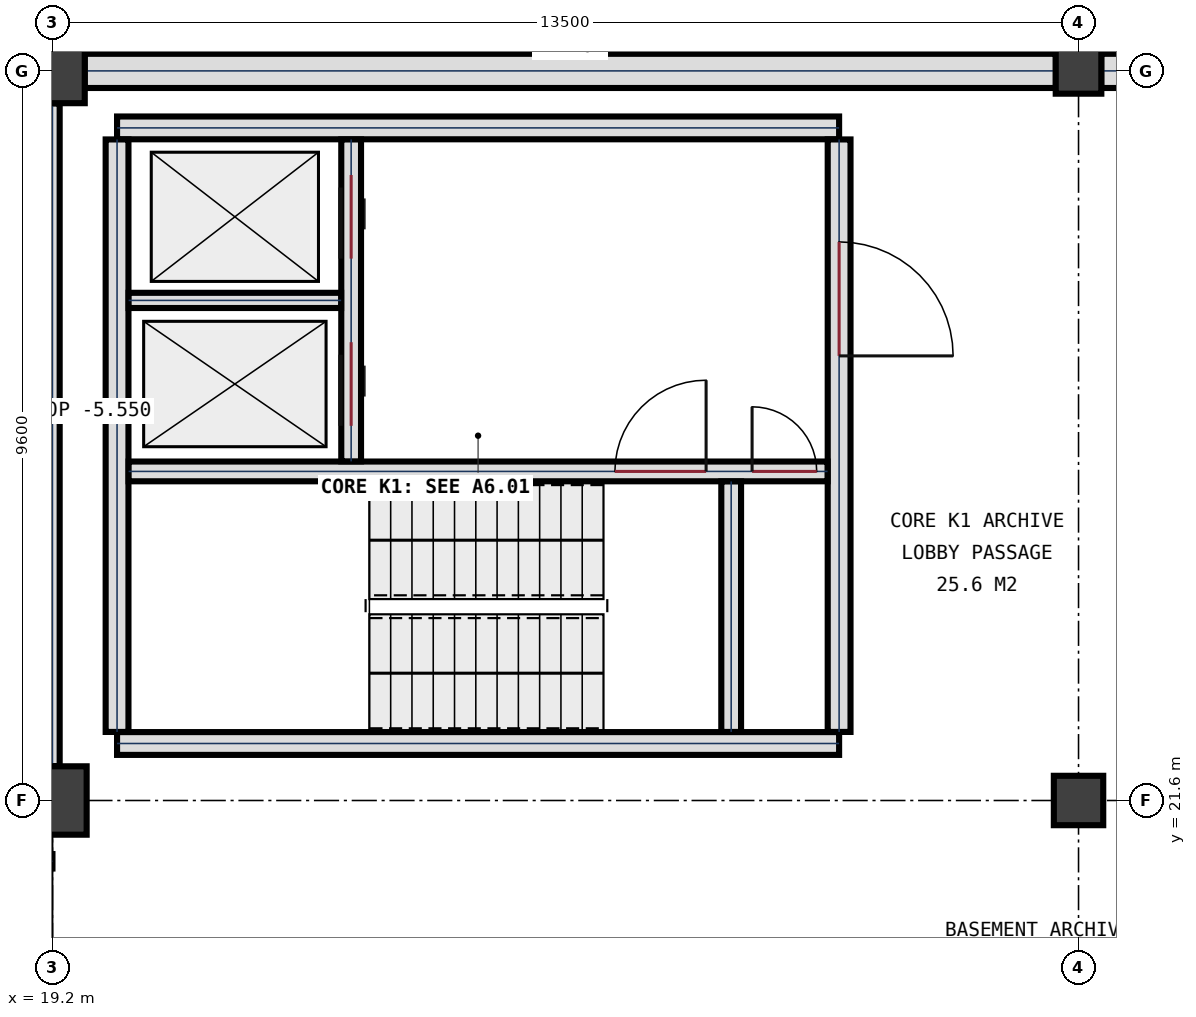
"""IFC4 building model, lengths in metres.
Left out: names, types, materials, properties, quantities, classifications, styles, units other than length and angle.
Written with IfcOpenShell. Run it as: python <this file> out.ifc"""

import sys

from ifc_helpers import new_model, si_unit, direction, frame, frame_2d, origin, origin_2d, place, context, subcontext, project, spatial, rectangle, extrude, element, fill, save


model = new_model("IFC4")
c1 = context("Model", 3, precision=1e-05, world=origin(), true_north=direction((0.0, 1.0)))
c2 = subcontext(c1, "Body", "Model", "MODEL_VIEW")
j1 = project(units=[si_unit("LENGTHUNIT", "METRE"), si_unit("PLANEANGLEUNIT", "RADIAN")], contexts=[c1])
p1 = place(None, origin())
s1 = spatial("IfcSite", under=j1, at=p1, CompositionType="ELEMENT")
p2 = place(p1, origin())
s2 = spatial("IfcBuilding", under=s1, at=p2, CompositionType="ELEMENT")
p3 = place(p2, frame((0.0, 0.0, -8.4)))
s3 = spatial("IfcBuildingStorey", under=s2, at=p3, CompositionType="ELEMENT", Elevation=-8.4)
p4 = place(p3, frame((19.2, 21.6, 0.0), z_axis=(0.0, 0.0, 1.0), x_axis=(1.0, 0.0, 0.0)))
e1 = element("IfcColumn", 1, at=p4, inside=s3, PredefinedType="COLUMN", context=c2, shape_type="SweptSolid", body=[
    extrude(rectangle(XDim=0.9, YDim=0.9, at=origin_2d()), origin(), (0.0, 0.0, 1.0), 4.2),
])
p5 = place(p3, frame((19.2, 31.2, 0.0), z_axis=(0.0, 0.0, 1.0), x_axis=(1.0, 0.0, 0.0)))
e2 = element("IfcColumn", 2, at=p5, inside=s3, PredefinedType="COLUMN", context=c2, shape_type="SweptSolid", body=[
    extrude(rectangle(XDim=0.85, YDim=0.85, at=origin_2d()), origin(), (0.0, 0.0, 1.0), 4.2),
])
p6 = place(p3, frame((32.7, 21.6, 0.0), z_axis=(0.0, 0.0, 1.0), x_axis=(1.0, 0.0, 0.0)))
e3 = element("IfcColumn", 3, at=p6, inside=s3, PredefinedType="COLUMN", context=c2, shape_type="SweptSolid", body=[
    extrude(rectangle(XDim=0.65, YDim=0.65, at=origin_2d()), origin(), (0.0, 0.0, 1.0), 4.2),
])
p7 = place(p3, frame((32.7, 31.2, 0.0), z_axis=(0.0, 0.0, 1.0), x_axis=(1.0, 0.0, 0.0)))
e4 = element("IfcColumn", 4, at=p7, inside=s3, PredefinedType="COLUMN", context=c2, shape_type="SweptSolid", body=[
    extrude(rectangle(XDim=0.6, YDim=0.6, at=origin_2d()), origin(), (0.0, 0.0, 1.0), 4.2),
])
p8 = place(p3, frame((19.623, 31.2, 0.0), z_axis=(0.0, 0.0, 1.0), x_axis=(1.0, 0.0, 0.0)))
e5 = element("IfcWall", 5, at=p8, inside=s3, PredefinedType="USERDEFINED", context=c2, shape_type="SweptSolid", body=[
    extrude(rectangle(XDim=12.779, YDim=0.45, at=frame_2d((6.39, 0.0))), origin(), (0.0, 0.0, 1.0), 3.86),
])
p9 = place(p3, frame((32.998, 31.2, 0.0), z_axis=(0.0, 0.0, 1.0), x_axis=(1.0, 0.0, 0.0)))
e6 = element("IfcWall", 6, at=p9, inside=s3, PredefinedType="USERDEFINED", context=c2, shape_type="SweptSolid", body=[
    extrude(rectangle(XDim=12.729, YDim=0.45, at=frame_2d((6.365, 0.0))), origin(), (0.0, 0.0, 1.0), 3.86),
])
for number, where, z_axis, x_axis in (
    (7, (29.55, 22.35, 0.0), (0.0, 0.0, 1.0), (-1.0, 0.0, 0.0)),
    (8, (20.05, 30.45, 0.0), (0.0, 0.0, 1.0), (1.0, 0.0, 0.0)),
):
    element("IfcWall", number, at=place(p3, frame(where, z_axis=z_axis, x_axis=x_axis)), inside=s3, PredefinedType="SHEAR", context=c2, shape_type="SweptSolid", body=[
        extrude(rectangle(XDim=9.5, YDim=0.3, at=frame_2d((4.75, 0.0))), origin(), (0.0, 0.0, 1.0), 4.2),
    ])
p10 = place(p3, frame((20.05, 22.502, 0.0), z_axis=(0.0, 0.0, 1.0), x_axis=(0.0, 1.0, 0.0)))
e9 = element("IfcWall", 9, at=p10, inside=s3, PredefinedType="SHEAR", context=c2, shape_type="SweptSolid", body=[
    extrude(rectangle(XDim=7.796, YDim=0.3, at=frame_2d((3.898, 0.0))), origin(), (0.0, 0.0, 1.0), 4.2),
])
p11 = place(p3, frame((29.55, 30.298, 0.0), z_axis=(0.0, 0.0, 1.0), x_axis=(0.0, -1.0, 0.0)))
e10 = element("IfcWall", 10, at=p11, inside=s3, PredefinedType="SHEAR", context=c2, shape_type="SweptSolid", body=[
    extrude(rectangle(XDim=7.796, YDim=0.3, at=frame_2d((3.898, 0.0))), origin(), (0.0, 0.0, 1.0), 4.2),
])
p12 = place(p11, frame((1.348, 0.0, 0.0)))
e11 = element("IfcOpeningElement", 11, at=p12, cuts=e10, PredefinedType="OPENING", context=c2, shape_type="SweptSolid", body=[
    extrude(rectangle(XDim=1.5, YDim=2.25, at=frame_2d((0.75, 1.125))), frame((0.0, 0.16, 0.0), z_axis=(0.0, -1.0, 0.0), x_axis=(1.0, 0.0, 0.0)), (0.0, 0.0, 1.0), 0.32),
])
p13 = place(p3, frame((20.202, 25.93, 0.0), z_axis=(0.0, 0.0, 1.0), x_axis=(1.0, 0.0, 0.0)))
e12 = element("IfcWall", 12, at=p13, inside=s3, PredefinedType="SHEAR", context=c2, shape_type="SweptSolid", body=[
    extrude(rectangle(XDim=9.196, YDim=0.26, at=frame_2d((4.598, 0.0))), origin(), (0.0, 0.0, 1.0), 4.2),
])
p14 = place(p13, frame((6.398, 0.0, 0.0)))
e13 = element("IfcOpeningElement", 13, at=p14, cuts=e12, PredefinedType="OPENING", context=c2, shape_type="SweptSolid", body=[
    extrude(rectangle(XDim=1.2, YDim=2.2, at=frame_2d((0.6, 1.1))), frame((0.0, 0.14, 0.0), z_axis=(0.0, -1.0, 0.0), x_axis=(1.0, 0.0, 0.0)), (0.0, 0.0, 1.0), 0.28),
])
p15 = place(p13, frame((8.203, 0.0, 0.0)))
e14 = element("IfcOpeningElement", 14, at=p15, cuts=e12, PredefinedType="OPENING", context=c2, shape_type="SweptSolid", body=[
    extrude(rectangle(XDim=0.85, YDim=2.05, at=frame_2d((0.425, 1.025))), frame((0.0, 0.14, 0.0), z_axis=(0.0, -1.0, 0.0), x_axis=(1.0, 0.0, 0.0)), (0.0, 0.0, 1.0), 0.28),
])
p16 = place(p3, frame((28.13, 22.502, 0.0), z_axis=(0.0, 0.0, 1.0), x_axis=(0.0, 1.0, 0.0)))
e15 = element("IfcWall", 15, at=p16, inside=s3, PredefinedType="SHEAR", context=c2, shape_type="SweptSolid", body=[
    extrude(rectangle(XDim=3.296, YDim=0.26, at=frame_2d((1.648, 0.0))), origin(), (0.0, 0.0, 1.0), 4.2),
])
p17 = place(p3, frame((23.13, 26.062, 0.0), z_axis=(0.0, 0.0, 1.0), x_axis=(0.0, 1.0, 0.0)))
e16 = element("IfcWall", 16, at=p17, inside=s3, PredefinedType="SHEAR", context=c2, shape_type="SweptSolid", body=[
    extrude(rectangle(XDim=4.236, YDim=0.26, at=frame_2d((2.118, 0.0))), origin(), (0.0, 0.0, 1.0), 4.2),
])
p18 = place(p17, frame((0.468, 0.0, 0.0)))
e17 = element("IfcOpeningElement", 17, at=p18, cuts=e16, PredefinedType="OPENING", context=c2, shape_type="SweptSolid", body=[
    extrude(rectangle(XDim=1.1, YDim=2.15, at=frame_2d((0.55, 1.075))), frame((0.0, 0.14, 0.0), z_axis=(0.0, -1.0, 0.0), x_axis=(1.0, 0.0, 0.0)), (0.0, 0.0, 1.0), 0.28),
])
p19 = place(p17, frame((2.668, 0.0, 0.0)))
e18 = element("IfcOpeningElement", 18, at=p19, cuts=e16, PredefinedType="OPENING", context=c2, shape_type="SweptSolid", body=[
    extrude(rectangle(XDim=1.1, YDim=2.15, at=frame_2d((0.55, 1.075))), frame((0.0, 0.14, 0.0), z_axis=(0.0, -1.0, 0.0), x_axis=(1.0, 0.0, 0.0)), (0.0, 0.0, 1.0), 0.28),
])
p20 = place(p3, frame((20.202, 28.18, 0.0), z_axis=(0.0, 0.0, 1.0), x_axis=(1.0, 0.0, 0.0)))
e19 = element("IfcWall", 19, at=p20, inside=s3, PredefinedType="PLUMBINGWALL", context=c2, shape_type="SweptSolid", body=[
    extrude(rectangle(XDim=2.796, YDim=0.2, at=frame_2d((1.398, 0.0))), origin(), (0.0, 0.0, 1.0), 3.86),
])
p21 = place(p3, frame((19.2, 22.053, 0.0), z_axis=(0.0, 0.0, 1.0), x_axis=(0.0, 1.0, 0.0)))
e20 = element("IfcWall", 20, at=p21, inside=s3, PredefinedType="PARTITIONING", context=c2, shape_type="SweptSolid", body=[
    extrude(rectangle(XDim=8.719, YDim=0.19, at=frame_2d((4.359, 0.0))), origin(), (0.0, 0.0, 1.0), 2.85),
])
p22 = place(p12, origin())
e21 = element("IfcDoor", 21, at=p22, inside=s3, OperationType="SINGLE_SWING_RIGHT", PredefinedType="DOOR", context=c2, shape_type="SweptSolid", body=[
    extrude(rectangle(XDim=1.5, YDim=2.25, at=frame_2d((0.75, 1.125))), frame((0.0, 0.032, 0.0), z_axis=(0.0, -1.0, 0.0), x_axis=(1.0, 0.0, 0.0)), (0.0, 0.0, 1.0), 0.065),
])
fill(e11, e21)
p23 = place(p14, origin())
e22 = element("IfcDoor", 22, at=p23, inside=s3, OperationType="SINGLE_SWING_RIGHT", PredefinedType="DOOR", context=c2, shape_type="SweptSolid", body=[
    extrude(rectangle(XDim=1.2, YDim=2.2, at=frame_2d((0.6, 1.1))), frame((0.0, 0.032, 0.0), z_axis=(0.0, -1.0, 0.0), x_axis=(1.0, 0.0, 0.0)), (0.0, 0.0, 1.0), 0.065),
])
fill(e13, e22)
p24 = place(p15, origin())
e23 = element("IfcDoor", 23, at=p24, inside=s3, OperationType="SINGLE_SWING_LEFT", PredefinedType="DOOR", context=c2, shape_type="SweptSolid", body=[
    extrude(rectangle(XDim=0.85, YDim=2.05, at=frame_2d((0.425, 1.025))), frame((0.0, 0.032, 0.0), z_axis=(0.0, -1.0, 0.0), x_axis=(1.0, 0.0, 0.0)), (0.0, 0.0, 1.0), 0.065),
])
fill(e14, e23)
p25 = place(p18, origin())
e24 = element("IfcDoor", 24, at=p25, inside=s3, OperationType="SLIDING_TO_LEFT", PredefinedType="DOOR", context=c2, shape_type="SweptSolid", body=[
    extrude(rectangle(XDim=1.1, YDim=2.15, at=frame_2d((0.55, 1.075))), frame((0.0, 0.032, 0.0), z_axis=(0.0, -1.0, 0.0), x_axis=(1.0, 0.0, 0.0)), (0.0, 0.0, 1.0), 0.065),
])
fill(e17, e24)
p26 = place(p19, origin())
e25 = element("IfcDoor", 25, at=p26, inside=s3, OperationType="SLIDING_TO_LEFT", PredefinedType="DOOR", context=c2, shape_type="SweptSolid", body=[
    extrude(rectangle(XDim=1.1, YDim=2.15, at=frame_2d((0.55, 1.075))), frame((0.0, 0.032, 0.0), z_axis=(0.0, -1.0, 0.0), x_axis=(1.0, 0.0, 0.0)), (0.0, 0.0, 1.0), 0.065),
])
fill(e18, e25)
save(model, sys.argv[1])
